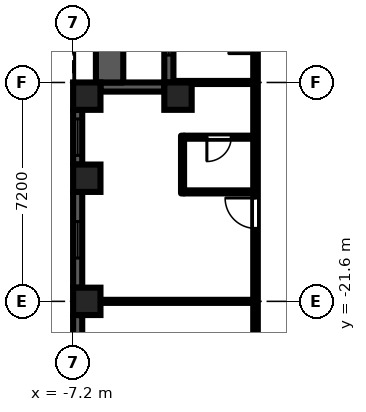
"""IFC4 building model, lengths in metres.
Left out: names, types, materials, properties, quantities, classifications, styles, units other than length and angle.
Written with IfcOpenShell. Run it as: python <this file> out.ifc"""

import sys

from ifc_helpers import new_model, si_unit, direction, frame, frame_2d, origin, origin_2d, place, context, subcontext, project, spatial, rectangle, extrude, element, fill, save


model = new_model("IFC4")
c1 = context("Model", 3, precision=1e-05, world=origin(), true_north=direction((0.0, 1.0)))
c2 = subcontext(c1, "Body", "Model", "MODEL_VIEW")
j1 = project(units=[si_unit("LENGTHUNIT", "METRE"), si_unit("PLANEANGLEUNIT", "RADIAN")], contexts=[c1])
p1 = place(None, origin())
s1 = spatial("IfcSite", under=j1, at=p1, CompositionType="ELEMENT")
p2 = place(p1, origin())
s2 = spatial("IfcBuilding", under=s1, at=p2, CompositionType="ELEMENT")
p3 = place(p2, frame((0.0, 0.0, 35.7)))
s3 = spatial("IfcBuildingStorey", under=s2, at=p3, CompositionType="ELEMENT", Elevation=35.7)
for number, where, z_axis, x_axis in (
    (1, (-6.75, -21.6, 0.0), (0.0, 0.0, 1.0), (1.0, 0.0, 0.0)),
    (2, (-6.75, -17.55, 0.0), (0.0, 0.0, 1.0), (1.0, 0.0, 0.0)),
    (3, (-6.75, -14.85, 0.0), (0.0, 0.0, 1.0), (1.0, 0.0, 0.0)),
    (4, (-3.75, -14.85, 0.0), (0.0, 0.0, 1.0), (1.0, 0.0, 0.0)),
):
    element("IfcColumn", number, at=place(p3, frame(where, z_axis=z_axis, x_axis=x_axis)), inside=s3, PredefinedType="COLUMN", context=c2, shape_type="SweptSolid", body=[
        extrude(rectangle(XDim=0.9, YDim=0.9, at=origin_2d()), origin(), (0.0, 0.0, 1.0), 3.0),
    ])
p4 = place(p3, frame((-4.05, -7.2, 0.0), z_axis=(0.0, 0.0, 1.0), x_axis=(0.0, -1.0, 0.0)))
e5 = element("IfcWall", 5, at=p4, inside=s3, PredefinedType="SOLIDWALL", context=c2, shape_type="SweptSolid", body=[
    extrude(rectangle(XDim=7.2, YDim=0.3, at=frame_2d((3.6, 0.0))), origin(), (0.0, 0.0, 1.0), 2.1),
])
p5 = place(p4, frame((3.0, 0.0, 0.0)))
e6 = element("IfcOpeningElement", 6, at=p5, cuts=e5, PredefinedType="OPENING", context=c2, shape_type="SweptSolid", body=[
    extrude(rectangle(XDim=1.2, YDim=2.05, at=frame_2d((0.6, 1.025))), frame((0.0, 0.16, 0.0), z_axis=(0.0, -1.0, 0.0), x_axis=(1.0, 0.0, 0.0)), (0.0, 0.0, 1.0), 0.32),
])
p6 = place(p4, frame((0.9, 0.0, 0.2)))
e7 = element("IfcOpeningElement", 7, at=p6, cuts=e5, PredefinedType="OPENING", context=c2, shape_type="SweptSolid", body=[
    extrude(rectangle(XDim=1.8, YDim=1.85, at=frame_2d((0.9, 0.925))), frame((0.0, 0.16, 0.0), z_axis=(0.0, -1.0, 0.0), x_axis=(1.0, 0.0, 0.0)), (0.0, 0.0, 1.0), 0.32),
])
p7 = place(p4, frame((4.5, 0.0, 0.2)))
e8 = element("IfcOpeningElement", 8, at=p7, cuts=e5, PredefinedType="OPENING", context=c2, shape_type="SweptSolid", body=[
    extrude(rectangle(XDim=1.8, YDim=1.85, at=frame_2d((0.9, 0.925))), frame((0.0, 0.16, 0.0), z_axis=(0.0, -1.0, 0.0), x_axis=(1.0, 0.0, 0.0)), (0.0, 0.0, 1.0), 0.32),
])
p8 = place(p3, frame((-4.2, -14.55, 0.0), z_axis=(0.0, 0.0, 1.0), x_axis=(-1.0, 0.0, 0.0)))
e9 = element("IfcWall", 9, at=p8, inside=s3, PredefinedType="SOLIDWALL", context=c2, shape_type="SweptSolid", body=[
    extrude(rectangle(XDim=2.1, YDim=0.3, at=frame_2d((1.05, 0.0))), origin(), (0.0, 0.0, 1.0), 2.1),
])
p9 = place(p3, frame((-7.05, -15.3, 0.0), z_axis=(0.0, 0.0, 1.0), x_axis=(0.0, -1.0, 0.0)))
e10 = element("IfcWall", 10, at=p9, inside=s3, PredefinedType="SOLIDWALL", context=c2, shape_type="SweptSolid", body=[
    extrude(rectangle(XDim=1.8, YDim=0.3, at=frame_2d((0.9, 0.0))), origin(), (0.0, 0.0, 1.0), 2.1),
])
p10 = place(p9, frame((0.3, 0.0, 0.2)))
e11 = element("IfcOpeningElement", 11, at=p10, cuts=e10, PredefinedType="OPENING", context=c2, shape_type="SweptSolid", body=[
    extrude(rectangle(XDim=1.2, YDim=1.85, at=frame_2d((0.6, 0.925))), frame((0.0, 0.16, 0.0), z_axis=(0.0, -1.0, 0.0), x_axis=(1.0, 0.0, 0.0)), (0.0, 0.0, 1.0), 0.32),
])
p11 = place(p3, frame((-7.05, -18.0, 0.0), z_axis=(0.0, 0.0, 1.0), x_axis=(0.0, -1.0, 0.0)))
e12 = element("IfcWall", 12, at=p11, inside=s3, PredefinedType="SOLIDWALL", context=c2, shape_type="SweptSolid", body=[
    extrude(rectangle(XDim=3.15, YDim=0.3, at=frame_2d((1.575, 0.0))), origin(), (0.0, 0.0, 1.0), 2.1),
])
p12 = place(p11, frame((0.975, 0.0, 0.2)))
e13 = element("IfcOpeningElement", 13, at=p12, cuts=e12, PredefinedType="OPENING", context=c2, shape_type="SweptSolid", body=[
    extrude(rectangle(XDim=1.2, YDim=1.85, at=frame_2d((0.6, 0.925))), frame((0.0, 0.16, 0.0), z_axis=(0.0, -1.0, 0.0), x_axis=(1.0, 0.0, 0.0)), (0.0, 0.0, 1.0), 0.32),
])
p13 = place(p3, frame((-7.05, -22.05, 0.0), z_axis=(0.0, 0.0, 1.0), x_axis=(0.0, -1.0, 0.0)))
e14 = element("IfcWall", 14, at=p13, inside=s3, PredefinedType="SOLIDWALL", context=c2, shape_type="SweptSolid", body=[
    extrude(rectangle(XDim=6.3, YDim=0.3, at=frame_2d((3.15, 0.0))), origin(), (0.0, 0.0, 1.0), 2.1),
])
p14 = place(p13, frame((0.975, 0.0, 0.2)))
e15 = element("IfcOpeningElement", 15, at=p14, cuts=e14, PredefinedType="OPENING", context=c2, shape_type="SweptSolid", body=[
    extrude(rectangle(XDim=1.2, YDim=1.85, at=frame_2d((0.6, 0.925))), frame((0.0, 0.16, 0.0), z_axis=(0.0, -1.0, 0.0), x_axis=(1.0, 0.0, 0.0)), (0.0, 0.0, 1.0), 0.32),
])
p15 = place(p13, frame((4.125, 0.0, 0.2)))
e16 = element("IfcOpeningElement", 16, at=p15, cuts=e14, PredefinedType="OPENING", context=c2, shape_type="SweptSolid", body=[
    extrude(rectangle(XDim=1.2, YDim=1.85, at=frame_2d((0.6, 0.925))), frame((0.0, 0.16, 0.0), z_axis=(0.0, -1.0, 0.0), x_axis=(1.0, 0.0, 0.0)), (0.0, 0.0, 1.0), 0.32),
])
p16 = place(p3, frame((-6.0, -14.4, 0.0), z_axis=(0.0, 0.0, 1.0), x_axis=(0.0, 1.0, 0.0)))
e17 = element("IfcWall", 17, at=p16, inside=s3, PredefinedType="PARAPET", context=c2, shape_type="SweptSolid", body=[
    extrude(rectangle(XDim=7.2, YDim=0.9, at=frame_2d((3.6, 0.0))), origin(), (0.0, 0.0, 1.0), 0.8),
])
p17 = place(p3, frame((-6.9, -21.6, 0.0), z_axis=(0.0, 0.0, 1.0), x_axis=(1.0, 0.0, 0.0)))
e18 = element("IfcWall", 18, at=p17, inside=s3, PredefinedType="PARTITIONING", context=c2, shape_type="SweptSolid", body=[
    extrude(rectangle(XDim=5.625, YDim=0.1, at=frame_2d((2.812, 0.0))), origin(), (0.0, 0.0, 1.0), 2.575),
])
p18 = place(p3, frame((-3.9, -14.4, 0.0), z_axis=(0.0, 0.0, 1.0), x_axis=(1.0, 0.0, 0.0)))
e19 = element("IfcWall", 19, at=p18, inside=s3, PredefinedType="PARTITIONING", context=c2, shape_type="SweptSolid", body=[
    extrude(rectangle(XDim=2.625, YDim=0.1, at=frame_2d((1.312, 0.0))), origin(), (0.0, 0.0, 1.0), 2.575),
])
p19 = place(p3, frame((-3.6, -18.05, 0.0), z_axis=(0.0, 0.0, 1.0), x_axis=(0.0, 1.0, 0.0)))
e20 = element("IfcWall", 20, at=p19, inside=s3, PredefinedType="PARTITIONING", context=c2, shape_type="SweptSolid", body=[
    extrude(rectangle(XDim=1.9, YDim=0.1, at=frame_2d((0.95, 0.0))), origin(), (0.0, 0.0, 1.0), 2.575),
])
p20 = place(p3, frame((-3.55, -18.0, 0.0), z_axis=(0.0, 0.0, 1.0), x_axis=(1.0, 0.0, 0.0)))
e21 = element("IfcWall", 21, at=p20, inside=s3, PredefinedType="PARTITIONING", context=c2, shape_type="SweptSolid", body=[
    extrude(rectangle(XDim=2.275, YDim=0.1, at=frame_2d((1.138, 0.0))), origin(), (0.0, 0.0, 1.0), 2.575),
])
p21 = place(p3, frame((-3.55, -16.2, 0.0), z_axis=(0.0, 0.0, 1.0), x_axis=(1.0, 0.0, 0.0)))
e22 = element("IfcWall", 22, at=p21, inside=s3, PredefinedType="PARTITIONING", context=c2, shape_type="SweptSolid", body=[
    extrude(rectangle(XDim=2.275, YDim=0.1, at=frame_2d((1.138, 0.0))), origin(), (0.0, 0.0, 1.0), 2.575),
])
p22 = place(p21, frame((0.75, 0.0, 0.0)))
e23 = element("IfcOpeningElement", 23, at=p22, cuts=e22, PredefinedType="OPENING", context=c2, shape_type="SweptSolid", body=[
    extrude(rectangle(XDim=0.8, YDim=2.1, at=frame_2d((0.4, 1.05))), frame((0.0, 0.06, 0.0), z_axis=(0.0, -1.0, 0.0), x_axis=(1.0, 0.0, 0.0)), (0.0, 0.0, 1.0), 0.12),
])
p23 = place(p3, frame((-1.2, -36.5, 0.0), z_axis=(0.0, 0.0, 1.0), x_axis=(0.0, 1.0, 0.0)))
e24 = element("IfcWall", 24, at=p23, inside=s3, PredefinedType="PARTITIONING", context=c2, shape_type="SweptSolid", body=[
    extrude(rectangle(XDim=35.225, YDim=0.15, at=frame_2d((17.613, 0.0))), origin(), (0.0, 0.0, 1.0), 2.575),
])
p24 = place(p23, frame((33.65, 0.0, 0.0)))
e25 = element("IfcOpeningElement", 25, at=p24, cuts=e24, PredefinedType="OPENING", context=c2, shape_type="SweptSolid", body=[
    extrude(rectangle(XDim=0.9, YDim=2.1, at=frame_2d((0.45, 1.05))), frame((0.0, 0.085, 0.0), z_axis=(0.0, -1.0, 0.0), x_axis=(1.0, 0.0, 0.0)), (0.0, 0.0, 1.0), 0.17),
])
p25 = place(p23, frame((30.65, 0.0, 0.0)))
e26 = element("IfcOpeningElement", 26, at=p25, cuts=e24, PredefinedType="OPENING", context=c2, shape_type="SweptSolid", body=[
    extrude(rectangle(XDim=0.9, YDim=2.1, at=frame_2d((0.45, 1.05))), frame((0.0, 0.085, 0.0), z_axis=(0.0, -1.0, 0.0), x_axis=(1.0, 0.0, 0.0)), (0.0, 0.0, 1.0), 0.17),
])
p26 = place(p23, frame((23.05, 0.0, 0.0)))
e27 = element("IfcOpeningElement", 27, at=p26, cuts=e24, PredefinedType="OPENING", context=c2, shape_type="SweptSolid", body=[
    extrude(rectangle(XDim=0.9, YDim=2.1, at=frame_2d((0.45, 1.05))), frame((0.0, 0.085, 0.0), z_axis=(0.0, -1.0, 0.0), x_axis=(1.0, 0.0, 0.0)), (0.0, 0.0, 1.0), 0.17),
])
p27 = place(p23, frame((26.65, 0.0, 0.0)))
e28 = element("IfcOpeningElement", 28, at=p27, cuts=e24, PredefinedType="OPENING", context=c2, shape_type="SweptSolid", body=[
    extrude(rectangle(XDim=0.9, YDim=2.1, at=frame_2d((0.45, 1.05))), frame((0.0, 0.085, 0.0), z_axis=(0.0, -1.0, 0.0), x_axis=(1.0, 0.0, 0.0)), (0.0, 0.0, 1.0), 0.17),
])
p28 = place(p23, frame((17.3, 0.0, 0.0)))
e29 = element("IfcOpeningElement", 29, at=p28, cuts=e24, PredefinedType="OPENING", context=c2, shape_type="SweptSolid", body=[
    extrude(rectangle(XDim=1.0, YDim=2.1, at=frame_2d((0.5, 1.05))), frame((0.0, 0.085, 0.0), z_axis=(0.0, -1.0, 0.0), x_axis=(1.0, 0.0, 0.0)), (0.0, 0.0, 1.0), 0.17),
])
p29 = place(p23, frame((12.65, 0.0, 0.0)))
e30 = element("IfcOpeningElement", 30, at=p29, cuts=e24, PredefinedType="OPENING", context=c2, shape_type="SweptSolid", body=[
    extrude(rectangle(XDim=0.9, YDim=2.1, at=frame_2d((0.45, 1.05))), frame((0.0, 0.085, 0.0), z_axis=(0.0, -1.0, 0.0), x_axis=(1.0, 0.0, 0.0)), (0.0, 0.0, 1.0), 0.17),
])
p30 = place(p23, frame((10.1, 0.0, 0.0)))
e31 = element("IfcOpeningElement", 31, at=p30, cuts=e24, PredefinedType="OPENING", context=c2, shape_type="SweptSolid", body=[
    extrude(rectangle(XDim=1.0, YDim=2.1, at=frame_2d((0.5, 1.05))), frame((0.0, 0.085, 0.0), z_axis=(0.0, -1.0, 0.0), x_axis=(1.0, 0.0, 0.0)), (0.0, 0.0, 1.0), 0.17),
])
p31 = place(p23, frame((6.35, 0.0, 0.0)))
e32 = element("IfcOpeningElement", 32, at=p31, cuts=e24, PredefinedType="OPENING", context=c2, shape_type="SweptSolid", body=[
    extrude(rectangle(XDim=0.9, YDim=2.1, at=frame_2d((0.45, 1.05))), frame((0.0, 0.085, 0.0), z_axis=(0.0, -1.0, 0.0), x_axis=(1.0, 0.0, 0.0)), (0.0, 0.0, 1.0), 0.17),
])
p32 = place(p23, frame((4.55, 0.0, 0.0)))
e33 = element("IfcOpeningElement", 33, at=p32, cuts=e24, PredefinedType="OPENING", context=c2, shape_type="SweptSolid", body=[
    extrude(rectangle(XDim=0.9, YDim=2.1, at=frame_2d((0.45, 1.05))), frame((0.0, 0.085, 0.0), z_axis=(0.0, -1.0, 0.0), x_axis=(1.0, 0.0, 0.0)), (0.0, 0.0, 1.0), 0.17),
])
p33 = place(p23, frame((1.15, 0.0, 0.0)))
e34 = element("IfcOpeningElement", 34, at=p33, cuts=e24, PredefinedType="OPENING", context=c2, shape_type="SweptSolid", body=[
    extrude(rectangle(XDim=1.8, YDim=2.1, at=frame_2d((0.9, 1.05))), frame((0.0, 0.085, 0.0), z_axis=(0.0, -1.0, 0.0), x_axis=(1.0, 0.0, 0.0)), (0.0, 0.0, 1.0), 0.17),
])
p34 = place(p7, origin())
e35 = element("IfcWindow", 35, at=p34, inside=s3, PartitioningType="SINGLE_PANEL", PredefinedType="WINDOW", context=c2, shape_type="SweptSolid", body=[
    extrude(rectangle(XDim=1.8, YDim=1.85, at=frame_2d((0.9, 0.925))), frame((0.0, 0.03, 0.0), z_axis=(0.0, -1.0, 0.0), x_axis=(1.0, 0.0, 0.0)), (0.0, 0.0, 1.0), 0.06),
])
fill(e8, e35)
p35 = place(p10, origin())
e36 = element("IfcWindow", 36, at=p35, inside=s3, PartitioningType="SINGLE_PANEL", PredefinedType="WINDOW", context=c2, shape_type="SweptSolid", body=[
    extrude(rectangle(XDim=1.2, YDim=1.85, at=frame_2d((0.6, 0.925))), frame((0.0, 0.03, 0.0), z_axis=(0.0, -1.0, 0.0), x_axis=(1.0, 0.0, 0.0)), (0.0, 0.0, 1.0), 0.06),
])
fill(e11, e36)
p36 = place(p12, origin())
e37 = element("IfcWindow", 37, at=p36, inside=s3, PartitioningType="SINGLE_PANEL", PredefinedType="WINDOW", context=c2, shape_type="SweptSolid", body=[
    extrude(rectangle(XDim=1.2, YDim=1.85, at=frame_2d((0.6, 0.925))), frame((0.0, 0.03, 0.0), z_axis=(0.0, -1.0, 0.0), x_axis=(1.0, 0.0, 0.0)), (0.0, 0.0, 1.0), 0.06),
])
fill(e13, e37)
p37 = place(p26, origin())
e38 = element("IfcDoor", 38, at=p37, inside=s3, OperationType="SINGLE_SWING_LEFT", PredefinedType="DOOR", context=c2, shape_type="SweptSolid", body=[
    extrude(rectangle(XDim=0.9, YDim=2.1, at=frame_2d((0.45, 1.05))), frame((0.0, 0.025, 0.0), z_axis=(0.0, -1.0, 0.0), x_axis=(1.0, 0.0, 0.0)), (0.0, 0.0, 1.0), 0.05),
])
fill(e27, e38)
p38 = place(p22, frame((0.8, 0.0, 0.0), z_axis=(0.0, 0.0, 1.0), x_axis=(-1.0, 0.0, 0.0)))
e39 = element("IfcDoor", 39, at=p38, inside=s3, OperationType="SINGLE_SWING_RIGHT", PredefinedType="DOOR", context=c2, shape_type="SweptSolid", body=[
    extrude(rectangle(XDim=0.8, YDim=2.1, at=frame_2d((0.4, 1.05))), frame((0.0, 0.025, 0.0), z_axis=(0.0, -1.0, 0.0), x_axis=(1.0, 0.0, 0.0)), (0.0, 0.0, 1.0), 0.05),
])
fill(e23, e39)
p39 = place(p28, origin())
e40 = element("IfcDoor", 40, at=p39, inside=s3, OperationType="SINGLE_SWING_RIGHT", PredefinedType="DOOR", context=c2, shape_type="SweptSolid", body=[
    extrude(rectangle(XDim=1.0, YDim=2.1, at=frame_2d((0.5, 1.05))), frame((0.0, 0.025, 0.0), z_axis=(0.0, -1.0, 0.0), x_axis=(1.0, 0.0, 0.0)), (0.0, 0.0, 1.0), 0.05),
])
fill(e29, e40)
save(model, sys.argv[1])
